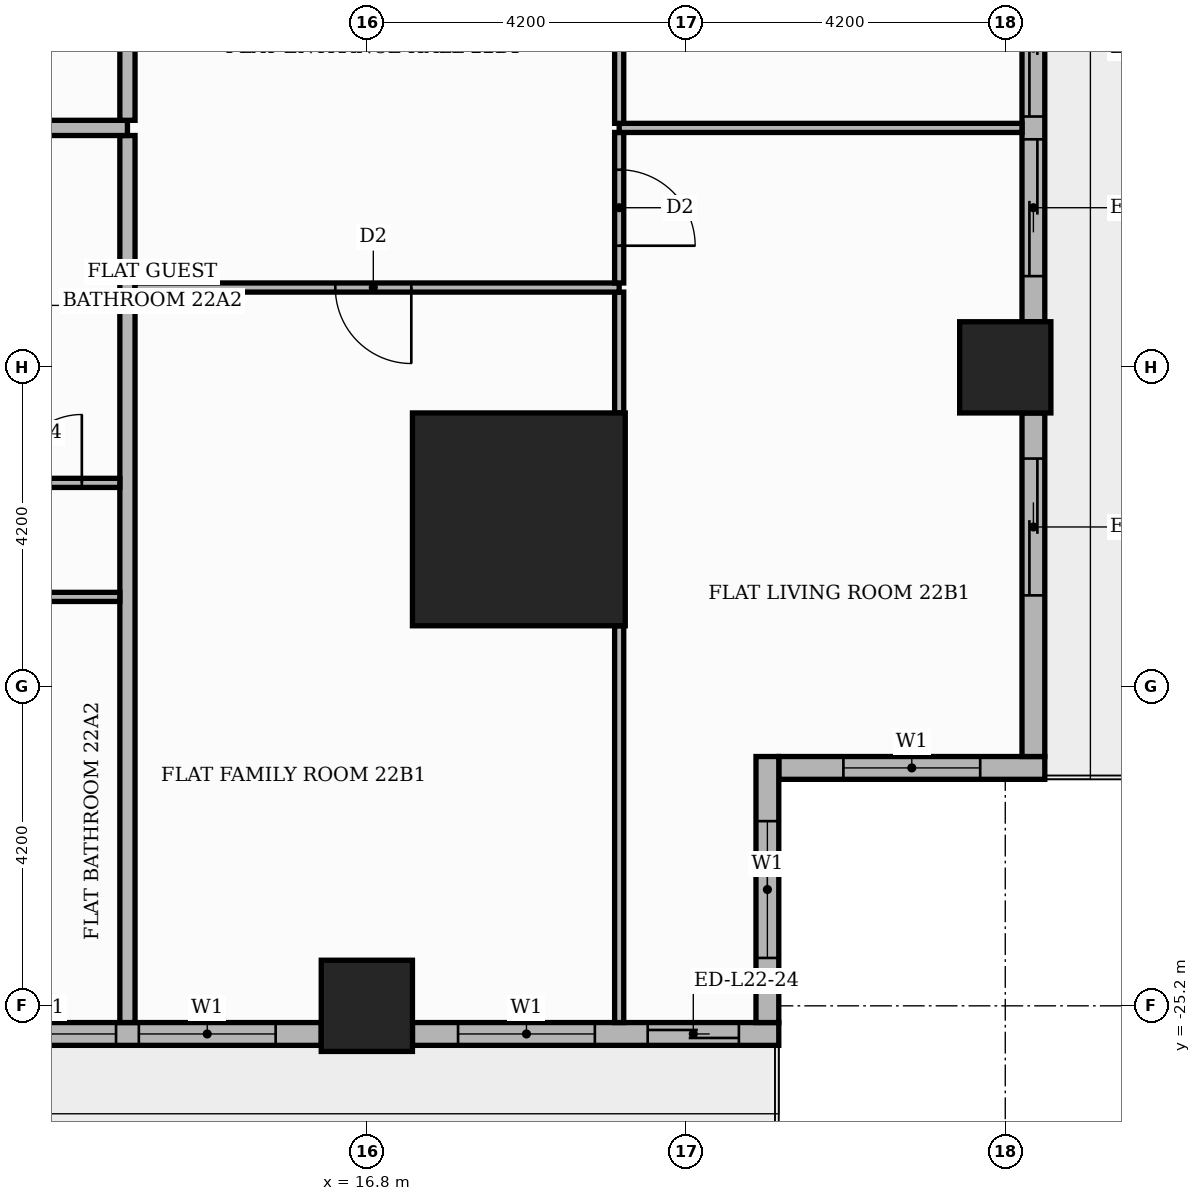
"""IFC4 building model, lengths in metres.
Left out: names, types, materials, properties, quantities, classifications, styles, units other than length and angle.
Written with IfcOpenShell. Run it as: python <this file> out.ifc"""

import sys

from ifc_helpers import new_model, si_unit, direction, frame, frame_2d, origin, origin_2d, place, context, subcontext, project, spatial, rectangle, extrude, element, fill, save


model = new_model("IFC4")
c1 = context("Model", 3, precision=1e-05, world=origin(), true_north=direction((0.0, 1.0)))
c2 = subcontext(c1, "Body", "Model", "MODEL_VIEW")
j1 = project(units=[si_unit("LENGTHUNIT", "METRE"), si_unit("PLANEANGLEUNIT", "RADIAN")], contexts=[c1])
p1 = place(None, origin())
s1 = spatial("IfcSite", under=j1, at=p1, CompositionType="ELEMENT")
p2 = place(p1, origin())
s2 = spatial("IfcBuilding", under=s1, at=p2, CompositionType="ELEMENT")
p3 = place(p2, frame((0.0, 0.0, 94.8)))
s3 = spatial("IfcBuildingStorey", under=s2, at=p3, CompositionType="ELEMENT", Elevation=94.8)
p4 = place(p3, frame((18.8, -18.8, 0.0), z_axis=(0.0, 0.0, 1.0), x_axis=(1.0, 0.0, 0.0)))
e1 = element("IfcColumn", 1, at=p4, inside=s3, PredefinedType="COLUMN", context=c2, shape_type="SweptSolid", body=[
    extrude(rectangle(XDim=2.8, YDim=2.8, at=origin_2d()), origin(), (0.0, 0.0, 1.0), 3.9),
])
for number, where, z_axis, x_axis in (
    (2, (25.2, -16.8, 0.0), (0.0, 0.0, 1.0), (1.0, 0.0, 0.0)),
    (3, (16.8, -25.2, 0.0), (0.0, 0.0, 1.0), (1.0, 0.0, 0.0)),
):
    element("IfcColumn", number, at=place(p3, frame(where, z_axis=z_axis, x_axis=x_axis)), inside=s3, PredefinedType="COLUMN", context=c2, shape_type="SweptSolid", body=[
        extrude(rectangle(XDim=1.2, YDim=1.2, at=origin_2d()), origin(), (0.0, 0.0, 1.0), 3.9),
    ])
p5 = place(p3, frame((22.22, -22.07, 0.0), z_axis=(0.0, 0.0, 1.0), x_axis=(1.0, 0.0, 0.0)))
e4 = element("IfcWall", 4, at=p5, inside=s3, PredefinedType="STANDARD", context=c2, shape_type="SweptSolid", body=[
    extrude(rectangle(XDim=3.5, YDim=0.3, at=frame_2d((1.75, 0.0))), origin(), (0.0, 0.0, 1.0), 3.48),
])
p6 = place(p5, frame((0.85, 0.0, 0.9)))
e5 = element("IfcOpeningElement", 5, at=p6, cuts=e4, PredefinedType="OPENING", context=c2, shape_type="SweptSolid", body=[
    extrude(rectangle(XDim=1.8, YDim=2.1, at=frame_2d((0.9, 1.05))), frame((0.0, 0.16, 0.0), z_axis=(0.0, -1.0, 0.0), x_axis=(1.0, 0.0, 0.0)), (0.0, 0.0, 1.0), 0.32),
])
p7 = place(p3, frame((25.57, -21.92, 0.0), z_axis=(0.0, 0.0, 1.0), x_axis=(0.0, 1.0, 0.0)))
e6 = element("IfcWall", 6, at=p7, inside=s3, PredefinedType="STANDARD", context=c2, shape_type="SweptSolid", body=[
    extrude(rectangle(XDim=4.52, YDim=0.3, at=frame_2d((2.26, 0.0))), origin(), (0.0, 0.0, 1.0), 3.48),
])
p8 = place(p7, frame((2.12, 0.0, 0.0)))
e7 = element("IfcOpeningElement", 7, at=p8, cuts=e6, PredefinedType="OPENING", context=c2, shape_type="SweptSolid", body=[
    extrude(rectangle(XDim=1.8, YDim=2.4, at=frame_2d((0.9, 1.2))), frame((0.0, 0.16, 0.0), z_axis=(0.0, -1.0, 0.0), x_axis=(1.0, 0.0, 0.0)), (0.0, 0.0, 1.0), 0.32),
])
p9 = place(p3, frame((25.57, -16.2, 0.0), z_axis=(0.0, 0.0, 1.0), x_axis=(0.0, 1.0, 0.0)))
e8 = element("IfcWall", 8, at=p9, inside=s3, PredefinedType="STANDARD", context=c2, shape_type="SweptSolid", body=[
    extrude(rectangle(XDim=7.2, YDim=0.3, at=frame_2d((3.6, 0.0))), origin(), (0.0, 0.0, 1.0), 3.48),
])
p10 = place(p9, frame((0.6, 0.0, 0.0)))
e9 = element("IfcOpeningElement", 9, at=p10, cuts=e8, PredefinedType="OPENING", context=c2, shape_type="SweptSolid", body=[
    extrude(rectangle(XDim=1.8, YDim=2.4, at=frame_2d((0.9, 1.2))), frame((0.0, 0.16, 0.0), z_axis=(0.0, -1.0, 0.0), x_axis=(1.0, 0.0, 0.0)), (0.0, 0.0, 1.0), 0.32),
])
p11 = place(p9, frame((2.7, 0.0, 0.0)))
e10 = element("IfcOpeningElement", 10, at=p11, cuts=e8, PredefinedType="OPENING", context=c2, shape_type="SweptSolid", body=[
    extrude(rectangle(XDim=1.8, YDim=2.4, at=frame_2d((0.9, 1.2))), frame((0.0, 0.16, 0.0), z_axis=(0.0, -1.0, 0.0), x_axis=(1.0, 0.0, 0.0)), (0.0, 0.0, 1.0), 0.32),
])
p12 = place(p9, frame((4.8, 0.0, 0.9)))
e11 = element("IfcOpeningElement", 11, at=p12, cuts=e8, PredefinedType="OPENING", context=c2, shape_type="SweptSolid", body=[
    extrude(rectangle(XDim=1.8, YDim=2.1, at=frame_2d((0.9, 1.05))), frame((0.0, 0.16, 0.0), z_axis=(0.0, -1.0, 0.0), x_axis=(1.0, 0.0, 0.0)), (0.0, 0.0, 1.0), 0.32),
])
p13 = place(p3, frame((9.0, -25.57, 0.0), z_axis=(0.0, 0.0, 1.0), x_axis=(1.0, 0.0, 0.0)))
e12 = element("IfcWall", 12, at=p13, inside=s3, PredefinedType="STANDARD", context=c2, shape_type="SweptSolid", body=[
    extrude(rectangle(XDim=7.2, YDim=0.3, at=frame_2d((3.6, 0.0))), origin(), (0.0, 0.0, 1.0), 3.48),
])
p14 = place(p13, frame((0.6, 0.0, 0.9)))
e13 = element("IfcOpeningElement", 13, at=p14, cuts=e12, PredefinedType="OPENING", context=c2, shape_type="SweptSolid", body=[
    extrude(rectangle(XDim=1.8, YDim=2.1, at=frame_2d((0.9, 1.05))), frame((0.0, 0.16, 0.0), z_axis=(0.0, -1.0, 0.0), x_axis=(1.0, 0.0, 0.0)), (0.0, 0.0, 1.0), 0.32),
])
p15 = place(p13, frame((2.7, 0.0, 0.9)))
e14 = element("IfcOpeningElement", 14, at=p15, cuts=e12, PredefinedType="OPENING", context=c2, shape_type="SweptSolid", body=[
    extrude(rectangle(XDim=1.8, YDim=2.1, at=frame_2d((0.9, 1.05))), frame((0.0, 0.16, 0.0), z_axis=(0.0, -1.0, 0.0), x_axis=(1.0, 0.0, 0.0)), (0.0, 0.0, 1.0), 0.32),
])
p16 = place(p13, frame((4.8, 0.0, 0.9)))
e15 = element("IfcOpeningElement", 15, at=p16, cuts=e12, PredefinedType="OPENING", context=c2, shape_type="SweptSolid", body=[
    extrude(rectangle(XDim=1.8, YDim=2.1, at=frame_2d((0.9, 1.05))), frame((0.0, 0.16, 0.0), z_axis=(0.0, -1.0, 0.0), x_axis=(1.0, 0.0, 0.0)), (0.0, 0.0, 1.0), 0.32),
])
p17 = place(p3, frame((17.4, -25.57, 0.0), z_axis=(0.0, 0.0, 1.0), x_axis=(1.0, 0.0, 0.0)))
e16 = element("IfcWall", 16, at=p17, inside=s3, PredefinedType="STANDARD", context=c2, shape_type="SweptSolid", body=[
    extrude(rectangle(XDim=4.82, YDim=0.3, at=frame_2d((2.41, 0.0))), origin(), (0.0, 0.0, 1.0), 3.48),
])
p18 = place(p17, frame((0.6, 0.0, 0.9)))
e17 = element("IfcOpeningElement", 17, at=p18, cuts=e16, PredefinedType="OPENING", context=c2, shape_type="SweptSolid", body=[
    extrude(rectangle(XDim=1.8, YDim=2.1, at=frame_2d((0.9, 1.05))), frame((0.0, 0.16, 0.0), z_axis=(0.0, -1.0, 0.0), x_axis=(1.0, 0.0, 0.0)), (0.0, 0.0, 1.0), 0.32),
])
p19 = place(p17, frame((3.095, 0.0, 0.0)))
e18 = element("IfcOpeningElement", 18, at=p19, cuts=e16, PredefinedType="OPENING", context=c2, shape_type="SweptSolid", body=[
    extrude(rectangle(XDim=1.2, YDim=2.4, at=frame_2d((0.6, 1.2))), frame((0.0, 0.16, 0.0), z_axis=(0.0, -1.0, 0.0), x_axis=(1.0, 0.0, 0.0)), (0.0, 0.0, 1.0), 0.32),
])
p20 = place(p3, frame((22.07, -25.42, 0.0), z_axis=(0.0, 0.0, 1.0), x_axis=(0.0, 1.0, 0.0)))
e19 = element("IfcWall", 19, at=p20, inside=s3, PredefinedType="STANDARD", context=c2, shape_type="SweptSolid", body=[
    extrude(rectangle(XDim=3.5, YDim=0.3, at=frame_2d((1.75, 0.0))), origin(), (0.0, 0.0, 1.0), 3.48),
])
p21 = place(p20, frame((0.85, 0.0, 0.9)))
e20 = element("IfcOpeningElement", 20, at=p21, cuts=e19, PredefinedType="OPENING", context=c2, shape_type="SweptSolid", body=[
    extrude(rectangle(XDim=1.8, YDim=2.1, at=frame_2d((0.9, 1.05))), frame((0.0, 0.16, 0.0), z_axis=(0.0, -1.0, 0.0), x_axis=(1.0, 0.0, 0.0)), (0.0, 0.0, 1.0), 0.32),
])
p22 = place(p3, frame((13.65, -25.42, 0.0), z_axis=(0.0, 0.0, 1.0), x_axis=(0.0, 1.0, 0.0)))
e21 = element("IfcWall", 21, at=p22, inside=s3, PredefinedType="PARTITIONING", context=c2, shape_type="SweptSolid", body=[
    extrude(rectangle(XDim=11.67, YDim=0.2, at=frame_2d((5.835, 0.0))), origin(), (0.0, 0.0, 1.0), 3.48),
])
p23 = place(p3, frame((20.12, -25.42, 0.0), z_axis=(0.0, 0.0, 1.0), x_axis=(0.0, 1.0, 0.0)))
e22 = element("IfcWall", 22, at=p23, inside=s3, PredefinedType="PARTITIONING", context=c2, shape_type="SweptSolid", body=[
    extrude(rectangle(XDim=5.22, YDim=0.12, at=frame_2d((2.61, 0.0))), origin(), (0.0, 0.0, 1.0), 3.48),
])
p24 = place(p3, frame((-5.15, -19.82, 0.0), z_axis=(0.0, 0.0, 1.0), x_axis=(1.0, 0.0, 0.0)))
e23 = element("IfcWall", 23, at=p24, inside=s3, PredefinedType="PARTITIONING", context=c2, shape_type="SweptSolid", body=[
    extrude(rectangle(XDim=18.7, YDim=0.12, at=frame_2d((9.35, 0.0))), origin(), (0.0, 0.0, 1.0), 3.48),
])
p25 = place(p24, frame((1.5, 0.0, 0.0)))
e24 = element("IfcOpeningElement", 24, at=p25, cuts=e23, PredefinedType="OPENING", context=c2, shape_type="SweptSolid", body=[
    extrude(rectangle(XDim=1.0, YDim=2.1, at=frame_2d((0.5, 1.05))), frame((0.0, 0.07, 0.0), z_axis=(0.0, -1.0, 0.0), x_axis=(1.0, 0.0, 0.0)), (0.0, 0.0, 1.0), 0.14),
])
p26 = place(p24, frame((5.75, 0.0, 0.0)))
e25 = element("IfcOpeningElement", 25, at=p26, cuts=e23, PredefinedType="OPENING", context=c2, shape_type="SweptSolid", body=[
    extrude(rectangle(XDim=0.9, YDim=2.1, at=frame_2d((0.45, 1.05))), frame((0.0, 0.07, 0.0), z_axis=(0.0, -1.0, 0.0), x_axis=(1.0, 0.0, 0.0)), (0.0, 0.0, 1.0), 0.14),
])
p27 = place(p24, frame((14.15, 0.0, 0.0)))
e26 = element("IfcOpeningElement", 26, at=p27, cuts=e23, PredefinedType="OPENING", context=c2, shape_type="SweptSolid", body=[
    extrude(rectangle(XDim=0.9, YDim=2.1, at=frame_2d((0.45, 1.05))), frame((0.0, 0.07, 0.0), z_axis=(0.0, -1.0, 0.0), x_axis=(1.0, 0.0, 0.0)), (0.0, 0.0, 1.0), 0.14),
])
p28 = place(p3, frame((1.05, -18.32, 0.0), z_axis=(0.0, 0.0, 1.0), x_axis=(1.0, 0.0, 0.0)))
e27 = element("IfcWall", 27, at=p28, inside=s3, PredefinedType="PARTITIONING", context=c2, shape_type="SweptSolid", body=[
    extrude(rectangle(XDim=12.5, YDim=0.12, at=frame_2d((6.25, 0.0))), origin(), (0.0, 0.0, 1.0), 3.48),
])
p29 = place(p28, frame((2.775, 0.0, 0.0)))
e28 = element("IfcOpeningElement", 28, at=p29, cuts=e27, PredefinedType="OPENING", context=c2, shape_type="SweptSolid", body=[
    extrude(rectangle(XDim=0.9, YDim=2.1, at=frame_2d((0.45, 1.05))), frame((0.0, 0.07, 0.0), z_axis=(0.0, -1.0, 0.0), x_axis=(1.0, 0.0, 0.0)), (0.0, 0.0, 1.0), 0.14),
])
p30 = place(p28, frame((6.975, 0.0, 0.0)))
e29 = element("IfcOpeningElement", 29, at=p30, cuts=e27, PredefinedType="OPENING", context=c2, shape_type="SweptSolid", body=[
    extrude(rectangle(XDim=0.9, YDim=2.1, at=frame_2d((0.45, 1.05))), frame((0.0, 0.07, 0.0), z_axis=(0.0, -1.0, 0.0), x_axis=(1.0, 0.0, 0.0)), (0.0, 0.0, 1.0), 0.14),
])
p31 = place(p28, frame((9.0, 0.0, 0.0)))
e30 = element("IfcOpeningElement", 30, at=p31, cuts=e27, PredefinedType="OPENING", context=c2, shape_type="SweptSolid", body=[
    extrude(rectangle(XDim=0.9, YDim=2.1, at=frame_2d((0.45, 1.05))), frame((0.0, 0.07, 0.0), z_axis=(0.0, -1.0, 0.0), x_axis=(1.0, 0.0, 0.0)), (0.0, 0.0, 1.0), 0.14),
])
p32 = place(p28, frame((11.1, 0.0, 0.0)))
e31 = element("IfcOpeningElement", 31, at=p32, cuts=e27, PredefinedType="OPENING", context=c2, shape_type="SweptSolid", body=[
    extrude(rectangle(XDim=0.9, YDim=2.1, at=frame_2d((0.45, 1.05))), frame((0.0, 0.07, 0.0), z_axis=(0.0, -1.0, 0.0), x_axis=(1.0, 0.0, 0.0)), (0.0, 0.0, 1.0), 0.14),
])
p33 = place(p3, frame((20.12, -17.4, 0.0), z_axis=(0.0, 0.0, 1.0), x_axis=(0.0, 1.0, 0.0)))
e32 = element("IfcWall", 32, at=p33, inside=s3, PredefinedType="PARTITIONING", context=c2, shape_type="SweptSolid", body=[
    extrude(rectangle(XDim=1.59, YDim=0.12, at=frame_2d((0.795, 0.0))), origin(), (0.0, 0.0, 1.0), 3.48),
])
p34 = place(p3, frame((13.75, -15.75, 0.0), z_axis=(0.0, 0.0, 1.0), x_axis=(1.0, 0.0, 0.0)))
e33 = element("IfcWall", 33, at=p34, inside=s3, PredefinedType="PARTITIONING", context=c2, shape_type="SweptSolid", body=[
    extrude(rectangle(XDim=6.37, YDim=0.12, at=frame_2d((3.185, 0.0))), origin(), (0.0, 0.0, 1.0), 3.48),
])
p35 = place(p34, frame((2.635, 0.0, 0.0)))
e34 = element("IfcOpeningElement", 34, at=p35, cuts=e33, PredefinedType="OPENING", context=c2, shape_type="SweptSolid", body=[
    extrude(rectangle(XDim=1.0, YDim=2.1, at=frame_2d((0.5, 1.05))), frame((0.0, 0.07, 0.0), z_axis=(0.0, -1.0, 0.0), x_axis=(1.0, 0.0, 0.0)), (0.0, 0.0, 1.0), 0.14),
])
p36 = place(p3, frame((20.12, -15.69, 0.0), z_axis=(0.0, 0.0, 1.0), x_axis=(0.0, 1.0, 0.0)))
e35 = element("IfcWall", 35, at=p36, inside=s3, PredefinedType="PARTITIONING", context=c2, shape_type="SweptSolid", body=[
    extrude(rectangle(XDim=1.98, YDim=0.12, at=frame_2d((0.99, 0.0))), origin(), (0.0, 0.0, 1.0), 3.48),
])
p37 = place(p36, frame((0.49, 0.0, 0.0)))
e36 = element("IfcOpeningElement", 36, at=p37, cuts=e35, PredefinedType="OPENING", context=c2, shape_type="SweptSolid", body=[
    extrude(rectangle(XDim=1.0, YDim=2.1, at=frame_2d((0.5, 1.05))), frame((0.0, 0.07, 0.0), z_axis=(0.0, -1.0, 0.0), x_axis=(1.0, 0.0, 0.0)), (0.0, 0.0, 1.0), 0.14),
])
p38 = place(p3, frame((-25.42, -13.65, 0.0), z_axis=(0.0, 0.0, 1.0), x_axis=(1.0, 0.0, 0.0)))
e37 = element("IfcWall", 37, at=p38, inside=s3, PredefinedType="PARTITIONING", context=c2, shape_type="SweptSolid", body=[
    extrude(rectangle(XDim=39.07, YDim=0.2, at=frame_2d((19.535, 0.0))), origin(), (0.0, 0.0, 1.0), 3.48),
])
p39 = place(p38, frame((13.32, 0.0, 0.0)))
e38 = element("IfcOpeningElement", 38, at=p39, cuts=e37, PredefinedType="OPENING", context=c2, shape_type="SweptSolid", body=[
    extrude(rectangle(XDim=1.1, YDim=2.4, at=frame_2d((0.55, 1.2))), frame((0.0, 0.11, 0.0), z_axis=(0.0, -1.0, 0.0), x_axis=(1.0, 0.0, 0.0)), (0.0, 0.0, 1.0), 0.22),
])
p40 = place(p38, frame((23.82, 0.0, 0.0)))
e39 = element("IfcOpeningElement", 39, at=p40, cuts=e37, PredefinedType="OPENING", context=c2, shape_type="SweptSolid", body=[
    extrude(rectangle(XDim=1.1, YDim=2.4, at=frame_2d((0.55, 1.2))), frame((0.0, 0.11, 0.0), z_axis=(0.0, -1.0, 0.0), x_axis=(1.0, 0.0, 0.0)), (0.0, 0.0, 1.0), 0.22),
])
p41 = place(p3, frame((20.12, -13.65, 0.0), z_axis=(0.0, 0.0, 1.0), x_axis=(1.0, 0.0, 0.0)))
e40 = element("IfcWall", 40, at=p41, inside=s3, PredefinedType="PARTITIONING", context=c2, shape_type="SweptSolid", body=[
    extrude(rectangle(XDim=5.3, YDim=0.12, at=frame_2d((2.65, 0.0))), origin(), (0.0, 0.0, 1.0), 3.48),
])
p42 = place(p3, frame((20.12, -13.59, 0.0), z_axis=(0.0, 0.0, 1.0), x_axis=(0.0, 1.0, 0.0)))
e41 = element("IfcWall", 41, at=p42, inside=s3, PredefinedType="PARTITIONING", context=c2, shape_type="SweptSolid", body=[
    extrude(rectangle(XDim=4.08, YDim=0.12, at=frame_2d((2.04, 0.0))), origin(), (0.0, 0.0, 1.0), 3.48),
])
p43 = place(p42, frame((1.59, 0.0, 0.0)))
e42 = element("IfcOpeningElement", 42, at=p43, cuts=e41, PredefinedType="OPENING", context=c2, shape_type="SweptSolid", body=[
    extrude(rectangle(XDim=0.9, YDim=2.1, at=frame_2d((0.45, 1.05))), frame((0.0, 0.07, 0.0), z_axis=(0.0, -1.0, 0.0), x_axis=(1.0, 0.0, 0.0)), (0.0, 0.0, 1.0), 0.14),
])
p44 = place(p3, frame((13.65, -13.55, 0.0), z_axis=(0.0, 0.0, 1.0), x_axis=(0.0, 1.0, 0.0)))
e43 = element("IfcWall", 43, at=p44, inside=s3, PredefinedType="PARTITIONING", context=c2, shape_type="SweptSolid", body=[
    extrude(rectangle(XDim=8.2, YDim=0.2, at=frame_2d((4.1, 0.0))), origin(), (0.0, 0.0, 1.0), 3.48),
])
p45 = place(p44, frame((1.45, 0.0, 0.0)))
e44 = element("IfcOpeningElement", 44, at=p45, cuts=e43, PredefinedType="OPENING", context=c2, shape_type="SweptSolid", body=[
    extrude(rectangle(XDim=1.1, YDim=2.4, at=frame_2d((0.55, 1.2))), frame((0.0, 0.11, 0.0), z_axis=(0.0, -1.0, 0.0), x_axis=(1.0, 0.0, 0.0)), (0.0, 0.0, 1.0), 0.22),
])
p46 = place(p6, origin())
e45 = element("IfcWindow", 45, at=p46, inside=s3, PartitioningType="SINGLE_PANEL", PredefinedType="WINDOW", context=c2, shape_type="SweptSolid", body=[
    extrude(rectangle(XDim=1.8, YDim=2.1, at=frame_2d((0.9, 1.05))), frame((0.0, 0.03, 0.0), z_axis=(0.0, -1.0, 0.0), x_axis=(1.0, 0.0, 0.0)), (0.0, 0.0, 1.0), 0.06),
])
fill(e5, e45)
p47 = place(p8, origin())
e46 = element("IfcDoor", 46, at=p47, inside=s3, OperationType="SLIDING_TO_RIGHT", PredefinedType="DOOR", context=c2, shape_type="SweptSolid", body=[
    extrude(rectangle(XDim=1.8, YDim=2.4, at=frame_2d((0.9, 1.2))), frame((0.0, 0.025, 0.0), z_axis=(0.0, -1.0, 0.0), x_axis=(1.0, 0.0, 0.0)), (0.0, 0.0, 1.0), 0.05),
])
fill(e7, e46)
p48 = place(p10, origin())
e47 = element("IfcDoor", 47, at=p48, inside=s3, OperationType="SLIDING_TO_LEFT", PredefinedType="DOOR", context=c2, shape_type="SweptSolid", body=[
    extrude(rectangle(XDim=1.8, YDim=2.4, at=frame_2d((0.9, 1.2))), frame((0.0, 0.025, 0.0), z_axis=(0.0, -1.0, 0.0), x_axis=(1.0, 0.0, 0.0)), (0.0, 0.0, 1.0), 0.05),
])
fill(e9, e47)
p49 = place(p11, origin())
e48 = element("IfcDoor", 48, at=p49, inside=s3, OperationType="SLIDING_TO_RIGHT", PredefinedType="DOOR", context=c2, shape_type="SweptSolid", body=[
    extrude(rectangle(XDim=1.8, YDim=2.4, at=frame_2d((0.9, 1.2))), frame((0.0, 0.025, 0.0), z_axis=(0.0, -1.0, 0.0), x_axis=(1.0, 0.0, 0.0)), (0.0, 0.0, 1.0), 0.05),
])
fill(e10, e48)
p50 = place(p15, origin())
e49 = element("IfcWindow", 49, at=p50, inside=s3, PartitioningType="SINGLE_PANEL", PredefinedType="WINDOW", context=c2, shape_type="SweptSolid", body=[
    extrude(rectangle(XDim=1.8, YDim=2.1, at=frame_2d((0.9, 1.05))), frame((0.0, 0.03, 0.0), z_axis=(0.0, -1.0, 0.0), x_axis=(1.0, 0.0, 0.0)), (0.0, 0.0, 1.0), 0.06),
])
fill(e14, e49)
p51 = place(p16, origin())
e50 = element("IfcWindow", 50, at=p51, inside=s3, PartitioningType="SINGLE_PANEL", PredefinedType="WINDOW", context=c2, shape_type="SweptSolid", body=[
    extrude(rectangle(XDim=1.8, YDim=2.1, at=frame_2d((0.9, 1.05))), frame((0.0, 0.03, 0.0), z_axis=(0.0, -1.0, 0.0), x_axis=(1.0, 0.0, 0.0)), (0.0, 0.0, 1.0), 0.06),
])
fill(e15, e50)
p52 = place(p18, origin())
e51 = element("IfcWindow", 51, at=p52, inside=s3, PartitioningType="SINGLE_PANEL", PredefinedType="WINDOW", context=c2, shape_type="SweptSolid", body=[
    extrude(rectangle(XDim=1.8, YDim=2.1, at=frame_2d((0.9, 1.05))), frame((0.0, 0.03, 0.0), z_axis=(0.0, -1.0, 0.0), x_axis=(1.0, 0.0, 0.0)), (0.0, 0.0, 1.0), 0.06),
])
fill(e17, e51)
p53 = place(p19, origin())
e52 = element("IfcDoor", 52, at=p53, inside=s3, OperationType="SLIDING_TO_RIGHT", PredefinedType="DOOR", context=c2, shape_type="SweptSolid", body=[
    extrude(rectangle(XDim=1.2, YDim=2.4, at=frame_2d((0.6, 1.2))), frame((0.0, 0.025, 0.0), z_axis=(0.0, -1.0, 0.0), x_axis=(1.0, 0.0, 0.0)), (0.0, 0.0, 1.0), 0.05),
])
fill(e18, e52)
p54 = place(p21, origin())
e53 = element("IfcWindow", 53, at=p54, inside=s3, PartitioningType="SINGLE_PANEL", PredefinedType="WINDOW", context=c2, shape_type="SweptSolid", body=[
    extrude(rectangle(XDim=1.8, YDim=2.1, at=frame_2d((0.9, 1.05))), frame((0.0, 0.03, 0.0), z_axis=(0.0, -1.0, 0.0), x_axis=(1.0, 0.0, 0.0)), (0.0, 0.0, 1.0), 0.06),
])
fill(e20, e53)
p55 = place(p32, origin())
e54 = element("IfcDoor", 54, at=p55, inside=s3, OperationType="SINGLE_SWING_RIGHT", PredefinedType="DOOR", context=c2, shape_type="SweptSolid", body=[
    extrude(rectangle(XDim=0.9, YDim=2.1, at=frame_2d((0.45, 1.05))), frame((0.0, 0.025, 0.0), z_axis=(0.0, -1.0, 0.0), x_axis=(1.0, 0.0, 0.0)), (0.0, 0.0, 1.0), 0.05),
])
fill(e31, e54)
p56 = place(p35, frame((1.0, 0.0, 0.0), z_axis=(0.0, 0.0, 1.0), x_axis=(-1.0, 0.0, 0.0)))
e55 = element("IfcDoor", 55, at=p56, inside=s3, OperationType="SINGLE_SWING_RIGHT", PredefinedType="DOOR", context=c2, shape_type="SweptSolid", body=[
    extrude(rectangle(XDim=1.0, YDim=2.1, at=frame_2d((0.5, 1.05))), frame((0.0, 0.025, 0.0), z_axis=(0.0, -1.0, 0.0), x_axis=(1.0, 0.0, 0.0)), (0.0, 0.0, 1.0), 0.05),
])
fill(e34, e55)
p57 = place(p37, frame((1.0, 0.0, 0.0), z_axis=(0.0, 0.0, 1.0), x_axis=(-1.0, 0.0, 0.0)))
e56 = element("IfcDoor", 56, at=p57, inside=s3, OperationType="SINGLE_SWING_LEFT", PredefinedType="DOOR", context=c2, shape_type="SweptSolid", body=[
    extrude(rectangle(XDim=1.0, YDim=2.1, at=frame_2d((0.5, 1.05))), frame((0.0, 0.025, 0.0), z_axis=(0.0, -1.0, 0.0), x_axis=(1.0, 0.0, 0.0)), (0.0, 0.0, 1.0), 0.05),
])
fill(e36, e56)
save(model, sys.argv[1])
